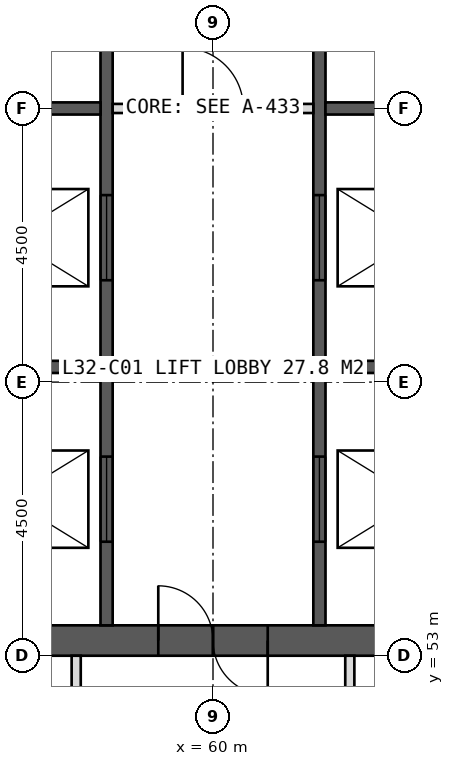
"""IFC4 building model, lengths in metres.
Left out: names, types, materials, properties, quantities, classifications, styles, units other than length and angle.
Written with IfcOpenShell. Run it as: python <this file> out.ifc"""

import sys

from ifc_helpers import new_model, si_unit, direction, frame, frame_2d, origin, place, context, subcontext, project, spatial, rectangle, extrude, element, fill, save


model = new_model("IFC4")
c1 = context("Model", 3, precision=1e-05, world=origin(), true_north=direction((0.0, 1.0)))
c2 = subcontext(c1, "Body", "Model", "MODEL_VIEW")
j1 = project(units=[si_unit("LENGTHUNIT", "METRE"), si_unit("PLANEANGLEUNIT", "RADIAN")], contexts=[c1])
p1 = place(None, origin())
s1 = spatial("IfcSite", under=j1, at=p1, CompositionType="ELEMENT")
p2 = place(p1, origin())
s2 = spatial("IfcBuilding", under=s1, at=p2, CompositionType="ELEMENT")
p3 = place(p2, frame((0.0, 0.0, 136.0)))
s3 = spatial("IfcBuildingStorey", under=s2, at=p3, CompositionType="ELEMENT", Elevation=136.0)
p4 = place(p3, frame((51.0, 53.25, 0.0), z_axis=(0.0, 0.0, 1.0), x_axis=(1.0, 0.0, 0.0)))
e1 = element("IfcWall", 1, at=p4, inside=s3, PredefinedType="SHEAR", context=c2, shape_type="SweptSolid", body=[
    extrude(rectangle(XDim=18.0, YDim=0.5, at=frame_2d((9.0, 0.0))), origin(), (0.0, 0.0, 1.0), 4.0),
])
p5 = place(p4, frame((8.1, 0.0, 0.0)))
e2 = element("IfcOpeningElement", 2, at=p5, cuts=e1, PredefinedType="OPENING", context=c2, shape_type="SweptSolid", body=[
    extrude(rectangle(XDim=1.8, YDim=2.2, at=frame_2d((0.9, 1.1))), frame((0.0, 0.26, 0.0), z_axis=(0.0, -1.0, 0.0), x_axis=(1.0, 0.0, 0.0)), (0.0, 0.0, 1.0), 0.52),
])
p6 = place(p3, frame((58.25, 53.5, 0.0), z_axis=(0.0, 0.0, 1.0), x_axis=(0.0, 1.0, 0.0)))
e3 = element("IfcWall", 3, at=p6, inside=s3, PredefinedType="SHEAR", context=c2, shape_type="SweptSolid", body=[
    extrude(rectangle(XDim=17.0, YDim=0.2, at=frame_2d((8.5, 0.0))), origin(), (0.0, 0.0, 1.0), 4.0),
])
p7 = place(p6, frame((1.375, 0.0, 0.0)))
e4 = element("IfcOpeningElement", 4, at=p7, cuts=e3, PredefinedType="OPENING", context=c2, shape_type="SweptSolid", body=[
    extrude(rectangle(XDim=1.4, YDim=2.2, at=frame_2d((0.7, 1.1))), frame((0.0, 0.11, 0.0), z_axis=(0.0, -1.0, 0.0), x_axis=(1.0, 0.0, 0.0)), (0.0, 0.0, 1.0), 0.22),
])
p8 = place(p6, frame((5.675, 0.0, 0.0)))
e5 = element("IfcOpeningElement", 5, at=p8, cuts=e3, PredefinedType="OPENING", context=c2, shape_type="SweptSolid", body=[
    extrude(rectangle(XDim=1.4, YDim=2.2, at=frame_2d((0.7, 1.1))), frame((0.0, 0.11, 0.0), z_axis=(0.0, -1.0, 0.0), x_axis=(1.0, 0.0, 0.0)), (0.0, 0.0, 1.0), 0.22),
])
p9 = place(p3, frame((61.75, 53.5, 0.0), z_axis=(0.0, 0.0, 1.0), x_axis=(0.0, 1.0, 0.0)))
e6 = element("IfcWall", 6, at=p9, inside=s3, PredefinedType="SHEAR", context=c2, shape_type="SweptSolid", body=[
    extrude(rectangle(XDim=17.0, YDim=0.2, at=frame_2d((8.5, 0.0))), origin(), (0.0, 0.0, 1.0), 4.0),
])
p10 = place(p9, frame((1.375, 0.0, 0.0)))
e7 = element("IfcOpeningElement", 7, at=p10, cuts=e6, PredefinedType="OPENING", context=c2, shape_type="SweptSolid", body=[
    extrude(rectangle(XDim=1.4, YDim=2.2, at=frame_2d((0.7, 1.1))), frame((0.0, 0.11, 0.0), z_axis=(0.0, -1.0, 0.0), x_axis=(1.0, 0.0, 0.0)), (0.0, 0.0, 1.0), 0.22),
])
p11 = place(p9, frame((5.675, 0.0, 0.0)))
e8 = element("IfcOpeningElement", 8, at=p11, cuts=e6, PredefinedType="OPENING", context=c2, shape_type="SweptSolid", body=[
    extrude(rectangle(XDim=1.4, YDim=2.2, at=frame_2d((0.7, 1.1))), frame((0.0, 0.11, 0.0), z_axis=(0.0, -1.0, 0.0), x_axis=(1.0, 0.0, 0.0)), (0.0, 0.0, 1.0), 0.22),
])
for number, where, z_axis, x_axis in (
    (9, (55.1, 57.75, 0.0), (0.0, 0.0, 1.0), (1.0, 0.0, 0.0)),
    (10, (61.85, 57.75, 0.0), (0.0, 0.0, 1.0), (1.0, 0.0, 0.0)),
    (11, (55.1, 62.0, 0.0), (0.0, 0.0, 1.0), (1.0, 0.0, 0.0)),
    (12, (61.85, 62.0, 0.0), (0.0, 0.0, 1.0), (1.0, 0.0, 0.0)),
):
    element("IfcWall", number, at=place(p3, frame(where, z_axis=z_axis, x_axis=x_axis)), inside=s3, PredefinedType="SHEAR", context=c2, shape_type="SweptSolid", body=[
        extrude(rectangle(XDim=3.05, YDim=0.2, at=frame_2d((1.525, 0.0))), origin(), (0.0, 0.0, 1.0), 4.0),
    ])
for number, where, z_axis, x_axis in (
    (13, (62.25, 53.0, 0.0), (0.0, 0.0, 1.0), (0.0, -1.0, 0.0)),
    (14, (57.75, 53.0, 0.0), (0.0, 0.0, 1.0), (0.0, -1.0, 0.0)),
):
    element("IfcWall", number, at=place(p3, frame(where, z_axis=z_axis, x_axis=x_axis)), inside=s3, PredefinedType="PARTITIONING", context=c2, shape_type="SweptSolid", body=[
        extrude(rectangle(XDim=5.1, YDim=0.15, at=frame_2d((2.55, 0.0))), origin(), (0.0, 0.0, 1.0), 3.75),
    ])
p12 = place(p3, frame((58.35, 62.0, 0.0), z_axis=(0.0, 0.0, 1.0), x_axis=(1.0, 0.0, 0.0)))
e15 = element("IfcWall", 15, at=p12, inside=s3, PredefinedType="PARTITIONING", context=c2, shape_type="SweptSolid", body=[
    extrude(rectangle(XDim=3.3, YDim=0.15, at=frame_2d((1.65, 0.0))), origin(), (0.0, 0.0, 1.0), 3.75),
])
p13 = place(p12, frame((1.15, 0.0, 0.0)))
e16 = element("IfcOpeningElement", 16, at=p13, cuts=e15, PredefinedType="OPENING", context=c2, shape_type="SweptSolid", body=[
    extrude(rectangle(XDim=1.0, YDim=2.1, at=frame_2d((0.5, 1.05))), frame((0.0, 0.085, 0.0), z_axis=(0.0, -1.0, 0.0), x_axis=(1.0, 0.0, 0.0)), (0.0, 0.0, 1.0), 0.17),
])
p14 = place(p5, origin())
e17 = element("IfcDoor", 17, at=p14, inside=s3, OperationType="DOUBLE_DOOR_SINGLE_SWING", PredefinedType="DOOR", context=c2, shape_type="SweptSolid", body=[
    extrude(rectangle(XDim=1.8, YDim=2.2, at=frame_2d((0.9, 1.1))), frame((0.0, 0.025, 0.0), z_axis=(0.0, -1.0, 0.0), x_axis=(1.0, 0.0, 0.0)), (0.0, 0.0, 1.0), 0.05),
])
fill(e2, e17)
p15 = place(p7, origin())
e18 = element("IfcDoor", 18, at=p15, inside=s3, OperationType="SLIDING_TO_LEFT", PredefinedType="DOOR", context=c2, shape_type="SweptSolid", body=[
    extrude(rectangle(XDim=1.4, YDim=2.2, at=frame_2d((0.7, 1.1))), frame((0.0, 0.025, 0.0), z_axis=(0.0, -1.0, 0.0), x_axis=(1.0, 0.0, 0.0)), (0.0, 0.0, 1.0), 0.05),
])
fill(e4, e18)
p16 = place(p10, origin())
e19 = element("IfcDoor", 19, at=p16, inside=s3, OperationType="SLIDING_TO_LEFT", PredefinedType="DOOR", context=c2, shape_type="SweptSolid", body=[
    extrude(rectangle(XDim=1.4, YDim=2.2, at=frame_2d((0.7, 1.1))), frame((0.0, 0.025, 0.0), z_axis=(0.0, -1.0, 0.0), x_axis=(1.0, 0.0, 0.0)), (0.0, 0.0, 1.0), 0.05),
])
fill(e7, e19)
p17 = place(p8, origin())
e20 = element("IfcDoor", 20, at=p17, inside=s3, OperationType="SLIDING_TO_LEFT", PredefinedType="DOOR", context=c2, shape_type="SweptSolid", body=[
    extrude(rectangle(XDim=1.4, YDim=2.2, at=frame_2d((0.7, 1.1))), frame((0.0, 0.025, 0.0), z_axis=(0.0, -1.0, 0.0), x_axis=(1.0, 0.0, 0.0)), (0.0, 0.0, 1.0), 0.05),
])
fill(e5, e20)
p18 = place(p11, origin())
e21 = element("IfcDoor", 21, at=p18, inside=s3, OperationType="SLIDING_TO_LEFT", PredefinedType="DOOR", context=c2, shape_type="SweptSolid", body=[
    extrude(rectangle(XDim=1.4, YDim=2.2, at=frame_2d((0.7, 1.1))), frame((0.0, 0.025, 0.0), z_axis=(0.0, -1.0, 0.0), x_axis=(1.0, 0.0, 0.0)), (0.0, 0.0, 1.0), 0.05),
])
fill(e8, e21)
p19 = place(p13, origin())
e22 = element("IfcDoor", 22, at=p19, inside=s3, OperationType="SINGLE_SWING_LEFT", PredefinedType="DOOR", context=c2, shape_type="SweptSolid", body=[
    extrude(rectangle(XDim=1.0, YDim=2.1, at=frame_2d((0.5, 1.05))), frame((0.0, 0.025, 0.0), z_axis=(0.0, -1.0, 0.0), x_axis=(1.0, 0.0, 0.0)), (0.0, 0.0, 1.0), 0.05),
])
fill(e16, e22)
save(model, sys.argv[1])
